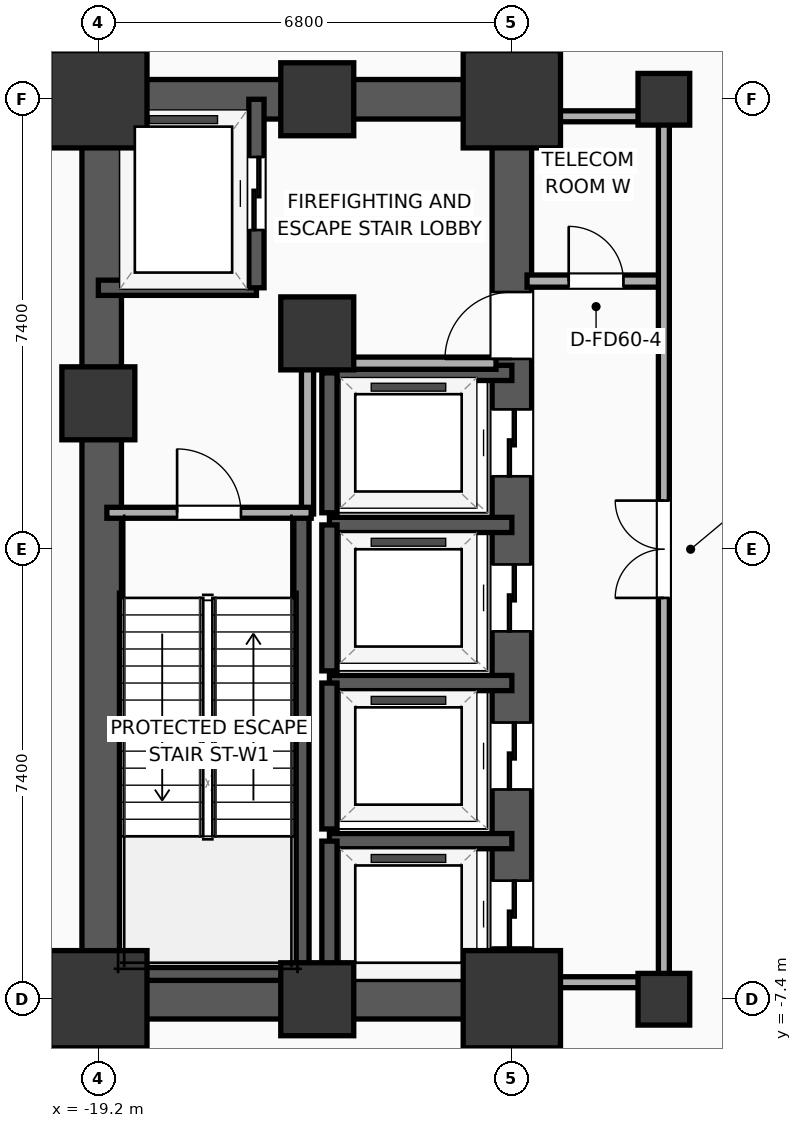
"""IFC4 building model, lengths in metres.
Left out: names, types, materials, properties, quantities, classifications, styles, units other than length and angle.
Written with IfcOpenShell. Run it as: python <this file> out.ifc"""

import sys

from ifc_helpers import new_model, si_unit, direction, frame, frame_2d, origin, origin_2d, place, context, subcontext, project, spatial, rectangle, extrude, element, fill, save


model = new_model("IFC4")
c1 = context("Model", 3, precision=1e-05, world=origin(), true_north=direction((0.0, 1.0)))
c2 = subcontext(c1, "Body", "Model", "MODEL_VIEW")
j1 = project(units=[si_unit("LENGTHUNIT", "METRE"), si_unit("PLANEANGLEUNIT", "RADIAN")], contexts=[c1])
p1 = place(None, origin())
s1 = spatial("IfcSite", under=j1, at=p1, CompositionType="ELEMENT")
p2 = place(p1, origin())
s2 = spatial("IfcBuilding", under=s1, at=p2, CompositionType="ELEMENT")
p3 = place(p2, frame((0.0, 0.0, -5.2)))
s3 = spatial("IfcBuildingStorey", under=s2, at=p3, CompositionType="ELEMENT", Elevation=-5.2)
p4 = place(p3, frame((-19.2, -7.4, 0.0), z_axis=(0.0, 0.0, 1.0), x_axis=(1.0, 0.0, 0.0)))
e1 = element("IfcColumn", 1, at=p4, inside=s3, PredefinedType="COLUMN", context=c2, shape_type="SweptSolid", body=[
    extrude(rectangle(XDim=1.6, YDim=1.6, at=origin_2d()), origin(), (0.0, 0.0, 1.0), 5.2),
])
p5 = place(p3, frame((-19.2, 2.4, 0.0), z_axis=(0.0, 0.0, 1.0), x_axis=(1.0, 0.0, 0.0)))
e2 = element("IfcColumn", 2, at=p5, inside=s3, PredefinedType="COLUMN", context=c2, shape_type="SweptSolid", body=[
    extrude(rectangle(XDim=1.2, YDim=1.2, at=origin_2d()), origin(), (0.0, 0.0, 1.0), 5.2),
])
p6 = place(p3, frame((-19.2, 7.4, 0.0), z_axis=(0.0, 0.0, 1.0), x_axis=(1.0, 0.0, 0.0)))
e3 = element("IfcColumn", 3, at=p6, inside=s3, PredefinedType="COLUMN", context=c2, shape_type="SweptSolid", body=[
    extrude(rectangle(XDim=1.6, YDim=1.6, at=origin_2d()), origin(), (0.0, 0.0, 1.0), 5.2),
])
for number, where, z_axis, x_axis in (
    (4, (-15.6, -7.4, 0.0), (0.0, 0.0, 1.0), (1.0, 0.0, 0.0)),
    (5, (-15.6, 7.4, 0.0), (0.0, 0.0, 1.0), (1.0, 0.0, 0.0)),
):
    element("IfcColumn", number, at=place(p3, frame(where, z_axis=z_axis, x_axis=x_axis)), inside=s3, PredefinedType="COLUMN", context=c2, shape_type="SweptSolid", body=[
        extrude(rectangle(XDim=1.2, YDim=1.2, at=origin_2d()), origin(), (0.0, 0.0, 1.0), 5.2),
    ])
p7 = place(p3, frame((-12.4, -7.4, 0.0), z_axis=(0.0, 0.0, 1.0), x_axis=(1.0, 0.0, 0.0)))
e6 = element("IfcColumn", 6, at=p7, inside=s3, PredefinedType="COLUMN", context=c2, shape_type="SweptSolid", body=[
    extrude(rectangle(XDim=1.6, YDim=1.6, at=origin_2d()), origin(), (0.0, 0.0, 1.0), 5.2),
])
p8 = place(p3, frame((-15.6, 3.55, 0.0), z_axis=(0.0, 0.0, 1.0), x_axis=(1.0, 0.0, 0.0)))
e7 = element("IfcColumn", 7, at=p8, inside=s3, PredefinedType="COLUMN", context=c2, shape_type="SweptSolid", body=[
    extrude(rectangle(XDim=1.2, YDim=1.2, at=origin_2d()), origin(), (0.0, 0.0, 1.0), 5.2),
])
p9 = place(p3, frame((-12.4, 7.4, 0.0), z_axis=(0.0, 0.0, 1.0), x_axis=(1.0, 0.0, 0.0)))
e8 = element("IfcColumn", 8, at=p9, inside=s3, PredefinedType="COLUMN", context=c2, shape_type="SweptSolid", body=[
    extrude(rectangle(XDim=1.6, YDim=1.6, at=origin_2d()), origin(), (0.0, 0.0, 1.0), 5.2),
])
for number, where, z_axis, x_axis in (
    (9, (-19.525, -7.4, 0.0), (0.0, 0.0, 1.0), (1.0, 0.0, 0.0)),
    (10, (-19.525, 7.4, 0.0), (0.0, 0.0, 1.0), (1.0, 0.0, 0.0)),
):
    element("IfcWall", number, at=place(p3, frame(where, z_axis=z_axis, x_axis=x_axis)), inside=s3, PredefinedType="SHEAR", context=c2, shape_type="SweptSolid", body=[
        extrude(rectangle(XDim=7.45, YDim=0.65, at=frame_2d((3.725, 0.0))), origin(), (0.0, 0.0, 1.0), 4.92),
    ])
p10 = place(p3, frame((-19.145, -7.4, 0.0), z_axis=(0.0, 0.0, 1.0), x_axis=(0.0, 1.0, 0.0)))
e11 = element("IfcWall", 11, at=p10, inside=s3, PredefinedType="SHEAR", context=c2, shape_type="SweptSolid", body=[
    extrude(rectangle(XDim=14.8, YDim=0.65, at=frame_2d((7.4, 0.0))), origin(), (0.0, 0.0, 1.0), 4.92),
])
p11 = place(p3, frame((-12.4, -7.4, 0.0), z_axis=(0.0, 0.0, 1.0), x_axis=(0.0, 1.0, 0.0)))
e12 = element("IfcWall", 12, at=p11, inside=s3, PredefinedType="SHEAR", context=c2, shape_type="SweptSolid", body=[
    extrude(rectangle(XDim=14.8, YDim=0.65, at=frame_2d((7.4, 0.0))), origin(), (0.0, 0.0, 1.0), 4.92),
])
p12 = place(p11, frame((0.85, 0.0, 0.0)))
e13 = element("IfcOpeningElement", 13, at=p12, cuts=e12, PredefinedType="OPENING", context=c2, shape_type="SweptSolid", body=[
    extrude(rectangle(XDim=1.1, YDim=2.05, at=frame_2d((0.55, 1.025))), frame((0.0, 0.335, 0.0), z_axis=(0.0, -1.0, 0.0), x_axis=(1.0, 0.0, 0.0)), (0.0, 0.0, 1.0), 0.67),
])
p13 = place(p11, frame((3.45, 0.0, 0.0)))
e14 = element("IfcOpeningElement", 14, at=p13, cuts=e12, PredefinedType="OPENING", context=c2, shape_type="SweptSolid", body=[
    extrude(rectangle(XDim=1.1, YDim=2.05, at=frame_2d((0.55, 1.025))), frame((0.0, 0.335, 0.0), z_axis=(0.0, -1.0, 0.0), x_axis=(1.0, 0.0, 0.0)), (0.0, 0.0, 1.0), 0.67),
])
p14 = place(p11, frame((6.05, 0.0, 0.0)))
e15 = element("IfcOpeningElement", 15, at=p14, cuts=e12, PredefinedType="OPENING", context=c2, shape_type="SweptSolid", body=[
    extrude(rectangle(XDim=1.1, YDim=2.05, at=frame_2d((0.55, 1.025))), frame((0.0, 0.335, 0.0), z_axis=(0.0, -1.0, 0.0), x_axis=(1.0, 0.0, 0.0)), (0.0, 0.0, 1.0), 0.67),
])
p15 = place(p11, frame((8.6, 0.0, 0.0)))
e16 = element("IfcOpeningElement", 16, at=p15, cuts=e12, PredefinedType="OPENING", context=c2, shape_type="SweptSolid", body=[
    extrude(rectangle(XDim=1.1, YDim=2.05, at=frame_2d((0.55, 1.025))), frame((0.0, 0.335, 0.0), z_axis=(0.0, -1.0, 0.0), x_axis=(1.0, 0.0, 0.0)), (0.0, 0.0, 1.0), 0.67),
])
p16 = place(p11, frame((10.53, 0.0, 0.0)))
e17 = element("IfcOpeningElement", 17, at=p16, cuts=e12, PredefinedType="OPENING", context=c2, shape_type="SweptSolid", body=[
    extrude(rectangle(XDim=1.1, YDim=2.05, at=frame_2d((0.55, 1.025))), frame((0.0, 0.335, 0.0), z_axis=(0.0, -1.0, 0.0), x_axis=(1.0, 0.0, 0.0)), (0.0, 0.0, 1.0), 0.67),
])
p17 = place(p3, frame((-15.86, -7.085, 0.0), z_axis=(0.0, 0.0, 1.0), x_axis=(0.0, 1.0, 0.0)))
e18 = element("IfcWall", 18, at=p17, inside=s3, PredefinedType="SOLIDWALL", context=c2, shape_type="SweptSolid", body=[
    extrude(rectangle(XDim=7.685, YDim=0.25, at=frame_2d((3.843, 0.0))), origin(), (0.0, 0.0, 1.0), 4.92),
])
p18 = place(p3, frame((-19.2, -6.965, 0.0), z_axis=(0.0, 0.0, 1.0), x_axis=(1.0, 0.0, 0.0)))
e19 = element("IfcWall", 19, at=p18, inside=s3, PredefinedType="SOLIDWALL", context=c2, shape_type="SweptSolid", body=[
    extrude(rectangle(XDim=3.46, YDim=0.25, at=frame_2d((1.73, 0.0))), origin(), (0.0, 0.0, 1.0), 4.92),
])
for number, where, z_axis, x_axis in (
    (20, (-9.9, -7.4, 0.0), (0.0, 0.0, 1.0), (1.0, 0.0, 0.0)),
    (21, (-9.9, 7.4, 0.0), (0.0, 0.0, 1.0), (1.0, 0.0, 0.0)),
):
    element("IfcColumn", number, at=place(p3, frame(where, z_axis=z_axis, x_axis=x_axis)), inside=s3, PredefinedType="COLUMN", context=c2, shape_type="SweptSolid", body=[
        extrude(rectangle(XDim=0.85, YDim=0.85, at=origin_2d()), origin(), (0.0, 0.0, 1.0), 5.2),
    ])
p19 = place(p3, frame((-19.2, 4.3, 0.0), z_axis=(0.0, 0.0, 1.0), x_axis=(1.0, 0.0, 0.0)))
e22 = element("IfcWall", 22, at=p19, inside=s3, PredefinedType="SOLIDWALL", context=c2, shape_type="SweptSolid", body=[
    extrude(rectangle(XDim=2.6, YDim=0.25, at=frame_2d((1.3, 0.0))), origin(), (0.0, 0.0, 1.0), 4.92),
])
p20 = place(p3, frame((-16.6, 4.3, 0.0), z_axis=(0.0, 0.0, 1.0), x_axis=(0.0, 1.0, 0.0)))
e23 = element("IfcWall", 23, at=p20, inside=s3, PredefinedType="SOLIDWALL", context=c2, shape_type="SweptSolid", body=[
    extrude(rectangle(XDim=3.1, YDim=0.25, at=frame_2d((1.55, 0.0))), origin(), (0.0, 0.0, 1.0), 4.92),
])
p21 = place(p20, frame((0.95, 0.0, 0.0)))
e24 = element("IfcOpeningElement", 24, at=p21, cuts=e23, PredefinedType="OPENING", context=c2, shape_type="SweptSolid", body=[
    extrude(rectangle(XDim=1.2, YDim=2.05, at=frame_2d((0.6, 1.025))), frame((0.0, 0.135, 0.0), z_axis=(0.0, -1.0, 0.0), x_axis=(1.0, 0.0, 0.0)), (0.0, 0.0, 1.0), 0.27),
])
p22 = place(p3, frame((-12.4, -4.8, 0.0), z_axis=(0.0, 0.0, 1.0), x_axis=(-1.0, 0.0, 0.0)))
e25 = element("IfcWall", 25, at=p22, inside=s3, PredefinedType="SOLIDWALL", context=c2, shape_type="SweptSolid", body=[
    extrude(rectangle(XDim=3.0, YDim=0.25, at=frame_2d((1.5, 0.0))), origin(), (0.0, 0.0, 1.0), 4.92),
])
p23 = place(p3, frame((-15.4, -4.8, 0.0), z_axis=(0.0, 0.0, 1.0), x_axis=(0.0, -1.0, 0.0)))
e26 = element("IfcWall", 26, at=p23, inside=s3, PredefinedType="SOLIDWALL", context=c2, shape_type="SweptSolid", body=[
    extrude(rectangle(XDim=2.6, YDim=0.25, at=frame_2d((1.3, 0.0))), origin(), (0.0, 0.0, 1.0), 4.92),
])
p24 = place(p3, frame((-12.4, -2.2, 0.0), z_axis=(0.0, 0.0, 1.0), x_axis=(-1.0, 0.0, 0.0)))
e27 = element("IfcWall", 27, at=p24, inside=s3, PredefinedType="SOLIDWALL", context=c2, shape_type="SweptSolid", body=[
    extrude(rectangle(XDim=3.0, YDim=0.25, at=frame_2d((1.5, 0.0))), origin(), (0.0, 0.0, 1.0), 4.92),
])
p25 = place(p3, frame((-15.4, -2.2, 0.0), z_axis=(0.0, 0.0, 1.0), x_axis=(0.0, -1.0, 0.0)))
e28 = element("IfcWall", 28, at=p25, inside=s3, PredefinedType="SOLIDWALL", context=c2, shape_type="SweptSolid", body=[
    extrude(rectangle(XDim=2.4, YDim=0.25, at=frame_2d((1.2, 0.0))), origin(), (0.0, 0.0, 1.0), 4.92),
])
p26 = place(p3, frame((-12.4, 0.4, 0.0), z_axis=(0.0, 0.0, 1.0), x_axis=(-1.0, 0.0, 0.0)))
e29 = element("IfcWall", 29, at=p26, inside=s3, PredefinedType="SOLIDWALL", context=c2, shape_type="SweptSolid", body=[
    extrude(rectangle(XDim=3.0, YDim=0.25, at=frame_2d((1.5, 0.0))), origin(), (0.0, 0.0, 1.0), 4.92),
])
p27 = place(p3, frame((-15.4, 0.4, 0.0), z_axis=(0.0, 0.0, 1.0), x_axis=(0.0, -1.0, 0.0)))
e30 = element("IfcWall", 30, at=p27, inside=s3, PredefinedType="SOLIDWALL", context=c2, shape_type="SweptSolid", body=[
    extrude(rectangle(XDim=2.4, YDim=0.25, at=frame_2d((1.2, 0.0))), origin(), (0.0, 0.0, 1.0), 4.92),
])
p28 = place(p3, frame((-12.4, 2.9, 0.0), z_axis=(0.0, 0.0, 1.0), x_axis=(-1.0, 0.0, 0.0)))
e31 = element("IfcWall", 31, at=p28, inside=s3, PredefinedType="SOLIDWALL", context=c2, shape_type="SweptSolid", body=[
    extrude(rectangle(XDim=3.0, YDim=0.25, at=frame_2d((1.5, 0.0))), origin(), (0.0, 0.0, 1.0), 4.92),
])
p29 = place(p3, frame((-15.4, 2.9, 0.0), z_axis=(0.0, 0.0, 1.0), x_axis=(0.0, -1.0, 0.0)))
e32 = element("IfcWall", 32, at=p29, inside=s3, PredefinedType="SOLIDWALL", context=c2, shape_type="SweptSolid", body=[
    extrude(rectangle(XDim=2.3, YDim=0.25, at=frame_2d((1.15, 0.0))), origin(), (0.0, 0.0, 1.0), 4.92),
])
p30 = place(p3, frame((-15.76, 0.58, 0.0), z_axis=(0.0, 0.0, 1.0), x_axis=(0.0, 1.0, 0.0)))
e33 = element("IfcWall", 33, at=p30, inside=s3, PredefinedType="PARTITIONING", context=c2, shape_type="SweptSolid", body=[
    extrude(rectangle(XDim=2.52, YDim=0.2, at=frame_2d((1.26, 0.0))), origin(), (0.0, 0.0, 1.0), 4.92),
])
p31 = place(p3, frame((-15.82, 3.06, 0.0), z_axis=(0.0, 0.0, 1.0), x_axis=(1.0, 0.0, 0.0)))
e34 = element("IfcWall", 34, at=p31, inside=s3, PredefinedType="PARTITIONING", context=c2, shape_type="SweptSolid", body=[
    extrude(rectangle(XDim=3.16, YDim=0.2, at=frame_2d((1.58, 0.0))), origin(), (0.0, 0.0, 1.0), 4.92),
])
p32 = place(p3, frame((-19.06, 0.6, 0.0), z_axis=(0.0, 0.0, 1.0), x_axis=(1.0, 0.0, 0.0)))
e35 = element("IfcWall", 35, at=p32, inside=s3, PredefinedType="PARTITIONING", context=c2, shape_type="SweptSolid", body=[
    extrude(rectangle(XDim=3.36, YDim=0.18, at=frame_2d((1.68, 0.0))), origin(), (0.0, 0.0, 1.0), 4.92),
])
p33 = place(p32, frame((1.155, 0.0, 0.0)))
e36 = element("IfcOpeningElement", 36, at=p33, cuts=e35, PredefinedType="OPENING", context=c2, shape_type="SweptSolid", body=[
    extrude(rectangle(XDim=1.05, YDim=2.05, at=frame_2d((0.525, 1.025))), frame((0.0, 0.1, 0.0), z_axis=(0.0, -1.0, 0.0), x_axis=(1.0, 0.0, 0.0)), (0.0, 0.0, 1.0), 0.2),
])
p34 = place(p3, frame((-12.15, 4.41, 0.0), z_axis=(0.0, 0.0, 1.0), x_axis=(1.0, 0.0, 0.0)))
e37 = element("IfcWall", 37, at=p34, inside=s3, PredefinedType="PARTITIONING", context=c2, shape_type="SweptSolid", body=[
    extrude(rectangle(XDim=2.27, YDim=0.2, at=frame_2d((1.135, 0.0))), origin(), (0.0, 0.0, 1.0), 4.92),
])
p35 = place(p34, frame((0.685, 0.0, 0.0)))
e38 = element("IfcOpeningElement", 38, at=p35, cuts=e37, PredefinedType="OPENING", context=c2, shape_type="SweptSolid", body=[
    extrude(rectangle(XDim=0.9, YDim=2.05, at=frame_2d((0.45, 1.025))), frame((0.0, 0.11, 0.0), z_axis=(0.0, -1.0, 0.0), x_axis=(1.0, 0.0, 0.0)), (0.0, 0.0, 1.0), 0.22),
])
for number, where, z_axis, x_axis in (
    (39, (-12.15, 7.12, 0.0), (0.0, 0.0, 1.0), (1.0, 0.0, 0.0)),
    (40, (-12.15, -7.12, 0.0), (0.0, 0.0, 1.0), (1.0, 0.0, 0.0)),
):
    element("IfcWall", number, at=place(p3, frame(where, z_axis=z_axis, x_axis=x_axis)), inside=s3, PredefinedType="PARTITIONING", context=c2, shape_type="SweptSolid", body=[
        extrude(rectangle(XDim=2.27, YDim=0.18, at=frame_2d((1.135, 0.0))), origin(), (0.0, 0.0, 1.0), 4.11),
    ])
p36 = place(p3, frame((-9.9, -7.12, 0.0), z_axis=(0.0, 0.0, 1.0), x_axis=(0.0, 1.0, 0.0)))
e41 = element("IfcWall", 41, at=p36, inside=s3, PredefinedType="PARTITIONING", context=c2, shape_type="SweptSolid", body=[
    extrude(rectangle(XDim=14.24, YDim=0.18, at=frame_2d((7.12, 0.0))), origin(), (0.0, 0.0, 1.0), 4.11),
])
p37 = place(p36, frame((6.32, 0.0, 0.0)))
e42 = element("IfcOpeningElement", 42, at=p37, cuts=e41, PredefinedType="OPENING", context=c2, shape_type="SweptSolid", body=[
    extrude(rectangle(XDim=1.6, YDim=2.05, at=frame_2d((0.8, 1.025))), frame((0.0, 0.1, 0.0), z_axis=(0.0, -1.0, 0.0), x_axis=(1.0, 0.0, 0.0)), (0.0, 0.0, 1.0), 0.2),
])
p38 = place(p21, origin())
e43 = element("IfcDoor", 43, at=p38, inside=s3, OperationType="SLIDING_TO_LEFT", PredefinedType="DOOR", context=c2, shape_type="SweptSolid", body=[
    extrude(rectangle(XDim=1.2, YDim=2.05, at=frame_2d((0.6, 1.025))), frame((0.0, 0.025, 0.0), z_axis=(0.0, -1.0, 0.0), x_axis=(1.0, 0.0, 0.0)), (0.0, 0.0, 1.0), 0.05),
])
fill(e24, e43)
p39 = place(p12, origin())
e44 = element("IfcDoor", 44, at=p39, inside=s3, OperationType="SLIDING_TO_LEFT", PredefinedType="DOOR", context=c2, shape_type="SweptSolid", body=[
    extrude(rectangle(XDim=1.1, YDim=2.05, at=frame_2d((0.55, 1.025))), frame((0.0, 0.025, 0.0), z_axis=(0.0, -1.0, 0.0), x_axis=(1.0, 0.0, 0.0)), (0.0, 0.0, 1.0), 0.05),
])
fill(e13, e44)
p40 = place(p13, origin())
e45 = element("IfcDoor", 45, at=p40, inside=s3, OperationType="SLIDING_TO_LEFT", PredefinedType="DOOR", context=c2, shape_type="SweptSolid", body=[
    extrude(rectangle(XDim=1.1, YDim=2.05, at=frame_2d((0.55, 1.025))), frame((0.0, 0.025, 0.0), z_axis=(0.0, -1.0, 0.0), x_axis=(1.0, 0.0, 0.0)), (0.0, 0.0, 1.0), 0.05),
])
fill(e14, e45)
p41 = place(p14, origin())
e46 = element("IfcDoor", 46, at=p41, inside=s3, OperationType="SLIDING_TO_LEFT", PredefinedType="DOOR", context=c2, shape_type="SweptSolid", body=[
    extrude(rectangle(XDim=1.1, YDim=2.05, at=frame_2d((0.55, 1.025))), frame((0.0, 0.025, 0.0), z_axis=(0.0, -1.0, 0.0), x_axis=(1.0, 0.0, 0.0)), (0.0, 0.0, 1.0), 0.05),
])
fill(e15, e46)
p42 = place(p15, origin())
e47 = element("IfcDoor", 47, at=p42, inside=s3, OperationType="SLIDING_TO_LEFT", PredefinedType="DOOR", context=c2, shape_type="SweptSolid", body=[
    extrude(rectangle(XDim=1.1, YDim=2.05, at=frame_2d((0.55, 1.025))), frame((0.0, 0.025, 0.0), z_axis=(0.0, -1.0, 0.0), x_axis=(1.0, 0.0, 0.0)), (0.0, 0.0, 1.0), 0.05),
])
fill(e16, e47)
p43 = place(p33, origin())
e48 = element("IfcDoor", 48, at=p43, inside=s3, OperationType="SINGLE_SWING_LEFT", PredefinedType="DOOR", context=c2, shape_type="SweptSolid", body=[
    extrude(rectangle(XDim=1.05, YDim=2.05, at=frame_2d((0.525, 1.025))), frame((0.0, 0.025, 0.0), z_axis=(0.0, -1.0, 0.0), x_axis=(1.0, 0.0, 0.0)), (0.0, 0.0, 1.0), 0.05),
])
fill(e36, e48)
p44 = place(p35, origin())
e49 = element("IfcDoor", 49, at=p44, inside=s3, OperationType="SINGLE_SWING_LEFT", PredefinedType="DOOR", context=c2, shape_type="SweptSolid", body=[
    extrude(rectangle(XDim=0.9, YDim=2.05, at=frame_2d((0.45, 1.025))), frame((0.0, 0.025, 0.0), z_axis=(0.0, -1.0, 0.0), x_axis=(1.0, 0.0, 0.0)), (0.0, 0.0, 1.0), 0.05),
])
fill(e38, e49)
p45 = place(p37, origin())
e50 = element("IfcDoor", 50, at=p45, inside=s3, OperationType="DOUBLE_DOOR_SINGLE_SWING", PredefinedType="DOOR", context=c2, shape_type="SweptSolid", body=[
    extrude(rectangle(XDim=1.6, YDim=2.05, at=frame_2d((0.8, 1.025))), frame((0.0, 0.025, 0.0), z_axis=(0.0, -1.0, 0.0), x_axis=(1.0, 0.0, 0.0)), (0.0, 0.0, 1.0), 0.05),
])
fill(e42, e50)
p46 = place(p16, origin())
e51 = element("IfcDoor", 51, at=p46, inside=s3, OperationType="SINGLE_SWING_LEFT", PredefinedType="DOOR", context=c2, shape_type="SweptSolid", body=[
    extrude(rectangle(XDim=1.1, YDim=2.05, at=frame_2d((0.55, 1.025))), frame((0.0, 0.025, 0.0), z_axis=(0.0, -1.0, 0.0), x_axis=(1.0, 0.0, 0.0)), (0.0, 0.0, 1.0), 0.05),
])
fill(e17, e51)
save(model, sys.argv[1])
